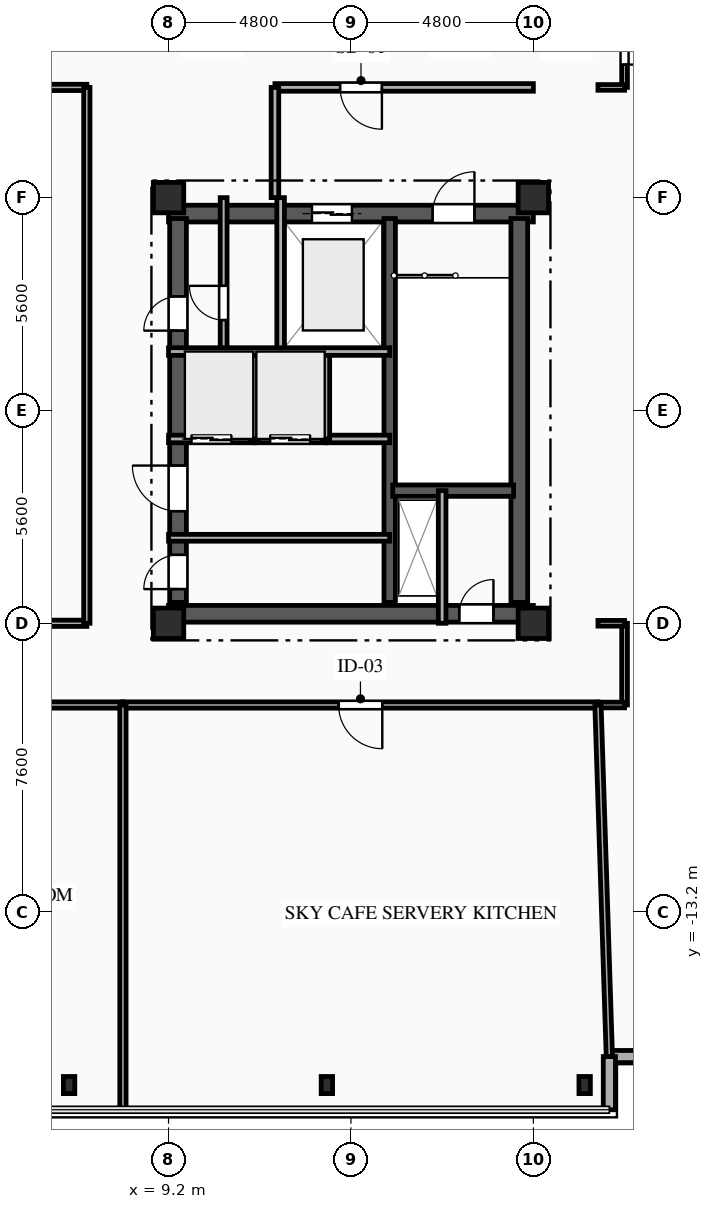
"""IFC4 building model, lengths in metres.
Left out: names, types, materials, properties, quantities, classifications, styles, units other than length and angle.
Written with IfcOpenShell. Run it as: python <this file> out.ifc"""

import sys

from ifc_helpers import new_model, si_unit, direction, frame, frame_2d, origin, origin_2d, place, context, subcontext, project, spatial, rectangle, i_section, extrude, element, fill, save


model = new_model("IFC4")
c1 = context("Model", 3, precision=1e-05, world=origin(), true_north=direction((0.0, 1.0)))
c2 = subcontext(c1, "Body", "Model", "MODEL_VIEW")
j1 = project(units=[si_unit("LENGTHUNIT", "METRE"), si_unit("PLANEANGLEUNIT", "RADIAN")], contexts=[c1])
p1 = place(None, origin())
s1 = spatial("IfcSite", under=j1, at=p1, CompositionType="ELEMENT")
p2 = place(p1, origin())
s2 = spatial("IfcBuilding", under=s1, at=p2, CompositionType="ELEMENT")
p3 = place(p2, frame((0.0, 0.0, 266.0)))
s3 = spatial("IfcBuildingStorey", under=s2, at=p3, CompositionType="ELEMENT", Elevation=266.0)
for number, where, z_axis, x_axis in (
    (1, (9.2, -5.6, 0.0), (0.0, 0.0, 1.0), (1.0, 0.0, 0.0)),
    (2, (9.2, 5.6, 0.0), (0.0, 0.0, 1.0), (1.0, 0.0, 0.0)),
    (3, (18.8, -5.6, 0.0), (0.0, 0.0, 1.0), (1.0, 0.0, 0.0)),
    (4, (18.8, 5.6, 0.0), (0.0, 0.0, 1.0), (1.0, 0.0, 0.0)),
):
    element("IfcColumn", number, at=place(p3, frame(where, z_axis=z_axis, x_axis=x_axis)), inside=s3, PredefinedType="COLUMN", context=c2, shape_type="SweptSolid", body=[
        extrude(rectangle(XDim=0.8, YDim=0.8, at=origin_2d()), origin(), (0.0, 0.0, 1.0), 4.2),
    ])
for number, where, z_axis, x_axis in (
    (5, (6.583, -17.75, 0.0), (0.0, 0.0, 1.0), (1.0, 0.0, 0.0)),
    (6, (13.367, -17.75, 0.0), (0.0, 0.0, 1.0), (1.0, 0.0, 0.0)),
    (7, (20.15, -17.75, 0.0), (0.0, 0.0, 1.0), (1.0, 0.0, 0.0)),
):
    element("IfcColumn", number, at=place(p3, frame(where, z_axis=z_axis, x_axis=x_axis)), inside=s3, PredefinedType="COLUMN", context=c2, shape_type="SweptSolid", body=[
        extrude(i_section(OverallWidth=0.3, OverallDepth=0.45, WebThickness=0.014, FlangeThickness=0.026, FilletRadius=0.027, at=origin_2d()), origin(), (0.0, 0.0, 1.0), 4.2),
    ])
for number, where, z_axis, x_axis in (
    (8, (22.2, -17.0, 0.0), (0.0, 0.0, 1.0), (-1.0, 0.0, 0.0)),
    (9, (20.8, -17.0, 0.0), (0.0, 0.0, 1.0), (0.0, -1.0, 0.0)),
):
    element("IfcWall", number, at=place(p3, frame(where, z_axis=z_axis, x_axis=x_axis)), inside=s3, PredefinedType="SOLIDWALL", context=c2, shape_type="SweptSolid", body=[
        extrude(rectangle(XDim=1.4, YDim=0.32, at=frame_2d((0.7, 0.0))), origin(), (0.0, 0.0, 1.0), 3.8),
    ])
p4 = place(p3, frame((9.2, 5.18, 0.0), z_axis=(0.0, 0.0, 1.0), x_axis=(1.0, 0.0, 0.0)))
e10 = element("IfcWall", 10, at=p4, inside=s3, PredefinedType="SHEAR", context=c2, shape_type="SweptSolid", body=[
    extrude(rectangle(XDim=9.6, YDim=0.44, at=frame_2d((4.8, 0.0))), origin(), (0.0, 0.0, 1.0), 3.8),
])
p5 = place(p4, frame((6.95, 0.0, 0.0)))
e11 = element("IfcOpeningElement", 11, at=p5, cuts=e10, PredefinedType="OPENING", context=c2, shape_type="SweptSolid", body=[
    extrude(rectangle(XDim=1.1, YDim=2.15, at=frame_2d((0.55, 1.075))), frame((0.0, 0.23, 0.0), z_axis=(0.0, -1.0, 0.0), x_axis=(1.0, 0.0, 0.0)), (0.0, 0.0, 1.0), 0.46),
])
p6 = place(p4, frame((3.775, 0.0, 0.0)))
e12 = element("IfcOpeningElement", 12, at=p6, cuts=e10, PredefinedType="OPENING", context=c2, shape_type="SweptSolid", body=[
    extrude(rectangle(XDim=1.05, YDim=2.1, at=frame_2d((0.525, 1.05))), frame((0.0, 0.23, 0.0), z_axis=(0.0, -1.0, 0.0), x_axis=(1.0, 0.0, 0.0)), (0.0, 0.0, 1.0), 0.46),
])
p7 = place(p3, frame((9.2, -5.35, 0.0), z_axis=(0.0, 0.0, 1.0), x_axis=(1.0, 0.0, 0.0)))
e13 = element("IfcWall", 13, at=p7, inside=s3, PredefinedType="SHEAR", context=c2, shape_type="SweptSolid", body=[
    extrude(rectangle(XDim=9.6, YDim=0.44, at=frame_2d((4.8, 0.0))), origin(), (0.0, 0.0, 1.0), 3.8),
])
p8 = place(p7, frame((7.65, 0.0, 0.0)))
e14 = element("IfcOpeningElement", 14, at=p8, cuts=e13, PredefinedType="OPENING", context=c2, shape_type="SweptSolid", body=[
    extrude(rectangle(XDim=0.9, YDim=2.1, at=frame_2d((0.45, 1.05))), frame((0.0, 0.23, 0.0), z_axis=(0.0, -1.0, 0.0), x_axis=(1.0, 0.0, 0.0)), (0.0, 0.0, 1.0), 0.46),
])
p9 = place(p3, frame((9.45, -5.05, 0.0), z_axis=(0.0, 0.0, 1.0), x_axis=(0.0, 1.0, 0.0)))
e15 = element("IfcWall", 15, at=p9, inside=s3, PredefinedType="SHEAR", context=c2, shape_type="SweptSolid", body=[
    extrude(rectangle(XDim=10.1, YDim=0.44, at=frame_2d((5.05, 0.0))), origin(), (0.0, 0.0, 1.0), 3.8),
])
p10 = place(p9, frame((7.15, 0.0, 0.0)))
e16 = element("IfcOpeningElement", 16, at=p10, cuts=e15, PredefinedType="OPENING", context=c2, shape_type="SweptSolid", body=[
    extrude(rectangle(XDim=0.9, YDim=2.1, at=frame_2d((0.45, 1.05))), frame((0.0, 0.23, 0.0), z_axis=(0.0, -1.0, 0.0), x_axis=(1.0, 0.0, 0.0)), (0.0, 0.0, 1.0), 0.46),
])
p11 = place(p9, frame((2.4, 0.0, 0.0)))
e17 = element("IfcOpeningElement", 17, at=p11, cuts=e15, PredefinedType="OPENING", context=c2, shape_type="SweptSolid", body=[
    extrude(rectangle(XDim=1.2, YDim=2.15, at=frame_2d((0.6, 1.075))), frame((0.0, 0.23, 0.0), z_axis=(0.0, -1.0, 0.0), x_axis=(1.0, 0.0, 0.0)), (0.0, 0.0, 1.0), 0.46),
])
p12 = place(p9, frame((0.35, 0.0, 0.0)))
e18 = element("IfcOpeningElement", 18, at=p12, cuts=e15, PredefinedType="OPENING", context=c2, shape_type="SweptSolid", body=[
    extrude(rectangle(XDim=0.9, YDim=2.1, at=frame_2d((0.45, 1.05))), frame((0.0, 0.23, 0.0), z_axis=(0.0, -1.0, 0.0), x_axis=(1.0, 0.0, 0.0)), (0.0, 0.0, 1.0), 0.46),
])
p13 = place(p3, frame((18.43, -5.05, 0.0), z_axis=(0.0, 0.0, 1.0), x_axis=(0.0, 1.0, 0.0)))
e19 = element("IfcWall", 19, at=p13, inside=s3, PredefinedType="SHEAR", context=c2, shape_type="SweptSolid", body=[
    extrude(rectangle(XDim=10.1, YDim=0.44, at=frame_2d((5.05, 0.0))), origin(), (0.0, 0.0, 1.0), 3.8),
])
p14 = place(p3, frame((15.02, -5.05, 0.0), z_axis=(0.0, 0.0, 1.0), x_axis=(0.0, 1.0, 0.0)))
e20 = element("IfcWall", 20, at=p14, inside=s3, PredefinedType="SHEAR", context=c2, shape_type="SweptSolid", body=[
    extrude(rectangle(XDim=10.1, YDim=0.3, at=frame_2d((5.05, 0.0))), origin(), (0.0, 0.0, 1.0), 3.8),
])
p15 = place(p3, frame((15.1, -2.11, 0.0), z_axis=(0.0, 0.0, 1.0), x_axis=(1.0, 0.0, 0.0)))
e21 = element("IfcWall", 21, at=p15, inside=s3, PredefinedType="SHEAR", context=c2, shape_type="SweptSolid", body=[
    extrude(rectangle(XDim=3.18, YDim=0.3, at=frame_2d((1.59, 0.0))), origin(), (0.0, 0.0, 1.0), 3.8),
])
p16 = place(p3, frame((16.4, -2.11, 0.0), z_axis=(0.0, 0.0, 1.0), x_axis=(0.0, -1.0, 0.0)))
e22 = element("IfcWall", 22, at=p16, inside=s3, PredefinedType="PARTITIONING", context=c2, shape_type="SweptSolid", body=[
    extrude(rectangle(XDim=3.49, YDim=0.2, at=frame_2d((1.745, 0.0))), origin(), (0.0, 0.0, 1.0), 3.8),
])
p17 = place(p3, frame((12.15, 5.6, 0.0), z_axis=(0.0, 0.0, 1.0), x_axis=(0.0, -1.0, 0.0)))
e23 = element("IfcWall", 23, at=p17, inside=s3, PredefinedType="PARTITIONING", context=c2, shape_type="SweptSolid", body=[
    extrude(rectangle(XDim=4.05, YDim=0.2, at=frame_2d((2.025, 0.0))), origin(), (0.0, 0.0, 1.0), 3.8),
])
p18 = place(p3, frame((18.8, 8.5, 0.0), z_axis=(0.0, 0.0, 1.0), x_axis=(-1.0, 0.0, 0.0)))
e24 = element("IfcWall", 24, at=p18, inside=s3, PredefinedType="PARTITIONING", context=c2, shape_type="SweptSolid", body=[
    extrude(rectangle(XDim=6.8, YDim=0.2, at=frame_2d((3.4, 0.0))), origin(), (0.0, 0.0, 1.0), 3.8),
])
p19 = place(p18, frame((3.985, 0.0, 0.0)))
e25 = element("IfcOpeningElement", 25, at=p19, cuts=e24, PredefinedType="OPENING", context=c2, shape_type="SweptSolid", body=[
    extrude(rectangle(XDim=1.1, YDim=2.15, at=frame_2d((0.55, 1.075))), frame((0.0, 0.11, 0.0), z_axis=(0.0, -1.0, 0.0), x_axis=(1.0, 0.0, 0.0)), (0.0, 0.0, 1.0), 0.22),
])
p20 = place(p3, frame((12.0, 8.5, 0.0), z_axis=(0.0, 0.0, 1.0), x_axis=(0.0, -1.0, 0.0)))
e26 = element("IfcWall", 26, at=p20, inside=s3, PredefinedType="PARTITIONING", context=c2, shape_type="SweptSolid", body=[
    extrude(rectangle(XDim=2.9, YDim=0.2, at=frame_2d((1.45, 0.0))), origin(), (0.0, 0.0, 1.0), 3.8),
])
p21 = place(p3, frame((10.65, 1.55, 0.0), z_axis=(0.0, 0.0, 1.0), x_axis=(0.0, 1.0, 0.0)))
e27 = element("IfcWall", 27, at=p21, inside=s3, PredefinedType="PARTITIONING", context=c2, shape_type="SweptSolid", body=[
    extrude(rectangle(XDim=4.05, YDim=0.18, at=frame_2d((2.025, 0.0))), origin(), (0.0, 0.0, 1.0), 3.8),
])
p22 = place(p21, frame((0.829, 0.0, 0.0)))
e28 = element("IfcOpeningElement", 28, at=p22, cuts=e27, PredefinedType="OPENING", context=c2, shape_type="SweptSolid", body=[
    extrude(rectangle(XDim=0.9, YDim=2.1, at=frame_2d((0.45, 1.05))), frame((0.0, 0.1, 0.0), z_axis=(0.0, -1.0, 0.0), x_axis=(1.0, 0.0, 0.0)), (0.0, 0.0, 1.0), 0.2),
])
p23 = place(p3, frame((9.2, -3.35, 0.0), z_axis=(0.0, 0.0, 1.0), x_axis=(1.0, 0.0, 0.0)))
e29 = element("IfcWall", 29, at=p23, inside=s3, PredefinedType="PARTITIONING", context=c2, shape_type="SweptSolid", body=[
    extrude(rectangle(XDim=5.82, YDim=0.18, at=frame_2d((2.91, 0.0))), origin(), (0.0, 0.0, 1.0), 3.8),
])
p24 = place(p3, frame((11.46, -0.75, 0.0), z_axis=(0.0, 0.0, 1.0), x_axis=(-1.0, 0.0, 0.0)))
e30 = element("IfcWall", 30, at=p24, inside=s3, PredefinedType="PARTITIONING", context=c2, shape_type="SweptSolid", body=[
    extrude(rectangle(XDim=2.26, YDim=0.2, at=frame_2d((1.13, 0.0))), origin(), (0.0, 0.0, 1.0), 3.8),
])
p25 = place(p24, frame((0.605, 0.0, 0.0)))
e31 = element("IfcOpeningElement", 31, at=p25, cuts=e30, PredefinedType="OPENING", context=c2, shape_type="SweptSolid", body=[
    extrude(rectangle(XDim=1.05, YDim=2.1, at=frame_2d((0.525, 1.05))), frame((0.0, 0.11, 0.0), z_axis=(0.0, -1.0, 0.0), x_axis=(1.0, 0.0, 0.0)), (0.0, 0.0, 1.0), 0.22),
])
p26 = place(p3, frame((13.34, -0.75, 0.0), z_axis=(0.0, 0.0, 1.0), x_axis=(-1.0, 0.0, 0.0)))
e32 = element("IfcWall", 32, at=p26, inside=s3, PredefinedType="PARTITIONING", context=c2, shape_type="SweptSolid", body=[
    extrude(rectangle(XDim=1.88, YDim=0.2, at=frame_2d((0.94, 0.0))), origin(), (0.0, 0.0, 1.0), 3.8),
])
p27 = place(p26, frame((0.415, 0.0, 0.0)))
e33 = element("IfcOpeningElement", 33, at=p27, cuts=e32, PredefinedType="OPENING", context=c2, shape_type="SweptSolid", body=[
    extrude(rectangle(XDim=1.05, YDim=2.1, at=frame_2d((0.525, 1.05))), frame((0.0, 0.11, 0.0), z_axis=(0.0, -1.0, 0.0), x_axis=(1.0, 0.0, 0.0)), (0.0, 0.0, 1.0), 0.22),
])
p28 = place(p3, frame((15.02, -0.75, 0.0), z_axis=(0.0, 0.0, 1.0), x_axis=(-1.0, 0.0, 0.0)))
e34 = element("IfcWall", 34, at=p28, inside=s3, PredefinedType="PARTITIONING", context=c2, shape_type="SweptSolid", body=[
    extrude(rectangle(XDim=1.68, YDim=0.2, at=frame_2d((0.84, 0.0))), origin(), (0.0, 0.0, 1.0), 3.8),
])
for number, where, z_axis, x_axis in (
    (35, (11.46, -0.75, 0.0), (0.0, 0.0, 1.0), (0.0, 1.0, 0.0)),
    (36, (13.34, -0.75, 0.0), (0.0, 0.0, 1.0), (0.0, 1.0, 0.0)),
):
    element("IfcWall", number, at=place(p3, frame(where, z_axis=z_axis, x_axis=x_axis)), inside=s3, PredefinedType="PARTITIONING", context=c2, shape_type="SweptSolid", body=[
        extrude(rectangle(XDim=2.3, YDim=0.2, at=frame_2d((1.15, 0.0))), origin(), (0.0, 0.0, 1.0), 3.8),
    ])
p29 = place(p3, frame((7.05, 8.5, 0.0), z_axis=(0.0, 0.0, 1.0), x_axis=(-1.0, 0.0, 0.0)))
e37 = element("IfcWall", 37, at=p29, inside=s3, PredefinedType="PARTITIONING", context=c2, shape_type="SweptSolid", body=[
    extrude(rectangle(XDim=4.05, YDim=0.165, at=frame_2d((2.025, 0.0))), origin(), (0.0, 0.0, 1.0), 3.8),
])
p30 = place(p3, frame((21.2, 10.65, 0.0), z_axis=(0.0, 0.0, 1.0), x_axis=(0.0, -1.0, 0.0)))
e38 = element("IfcWall", 38, at=p30, inside=s3, PredefinedType="PARTITIONING", context=c2, shape_type="SweptSolid", body=[
    extrude(rectangle(XDim=2.15, YDim=0.15, at=frame_2d((1.075, 0.0))), origin(), (0.0, 0.0, 1.0), 3.8),
])
p31 = place(p30, frame((0.6, 0.0, 0.0)))
e39 = element("IfcOpeningElement", 39, at=p31, cuts=e38, PredefinedType="OPENING", context=c2, shape_type="SweptSolid", body=[
    extrude(rectangle(XDim=0.95, YDim=2.1, at=frame_2d((0.475, 1.05))), frame((0.0, 0.085, 0.0), z_axis=(0.0, -1.0, 0.0), x_axis=(1.0, 0.0, 0.0)), (0.0, 0.0, 1.0), 0.17),
])
p32 = place(p3, frame((21.2, 8.5, 0.0), z_axis=(0.0, 0.0, 1.0), x_axis=(-1.0, 0.0, 0.0)))
e40 = element("IfcWall", 40, at=p32, inside=s3, PredefinedType="PARTITIONING", context=c2, shape_type="SweptSolid", body=[
    extrude(rectangle(XDim=0.7, YDim=0.15, at=frame_2d((0.35, 0.0))), origin(), (0.0, 0.0, 1.0), 3.8),
])
p33 = place(p3, frame((0.0, -5.6, 0.0), z_axis=(0.0, 0.0, 1.0), x_axis=(1.0, 0.0, 0.0)))
e41 = element("IfcWall", 41, at=p33, inside=s3, PredefinedType="PARTITIONING", context=c2, shape_type="SweptSolid", body=[
    extrude(rectangle(XDim=7.05, YDim=0.165, at=frame_2d((3.525, 0.0))), origin(), (0.0, 0.0, 1.0), 3.285),
])
p34 = place(p3, frame((8.0, -7.75, 0.0), z_axis=(0.0, 0.0, 1.0), x_axis=(-1.0, 0.0, 0.0)))
e42 = element("IfcWall", 42, at=p34, inside=s3, PredefinedType="PARTITIONING", context=c2, shape_type="SweptSolid", body=[
    extrude(rectangle(XDim=8.0, YDim=0.165, at=frame_2d((4.0, 0.0))), origin(), (0.0, 0.0, 1.0), 3.8),
])
p35 = place(p3, frame((20.5, -7.75, 0.0), z_axis=(0.0, 0.0, 1.0), x_axis=(-1.0, 0.0, 0.0)))
e43 = element("IfcWall", 43, at=p35, inside=s3, PredefinedType="PARTITIONING", context=c2, shape_type="SweptSolid", body=[
    extrude(rectangle(XDim=12.5, YDim=0.165, at=frame_2d((6.25, 0.0))), origin(), (0.0, 0.0, 1.0), 3.8),
])
p36 = place(p35, frame((5.675, 0.0, 0.0)))
e44 = element("IfcOpeningElement", 44, at=p36, cuts=e43, PredefinedType="OPENING", context=c2, shape_type="SweptSolid", body=[
    extrude(rectangle(XDim=1.15, YDim=2.15, at=frame_2d((0.575, 1.075))), frame((0.0, 0.093, 0.0), z_axis=(0.0, -1.0, 0.0), x_axis=(1.0, 0.0, 0.0)), (0.0, 0.0, 1.0), 0.185),
])
p37 = place(p3, frame((21.2, -5.6, 0.0), z_axis=(0.0, 0.0, 1.0), x_axis=(0.0, -1.0, 0.0)))
e45 = element("IfcWall", 45, at=p37, inside=s3, PredefinedType="PARTITIONING", context=c2, shape_type="SweptSolid", body=[
    extrude(rectangle(XDim=2.15, YDim=0.15, at=frame_2d((1.075, 0.0))), origin(), (0.0, 0.0, 1.0), 3.8),
])
for number, where, z_axis, x_axis in (
    (46, (20.5, -5.6, 0.0), (0.0, 0.0, 1.0), (1.0, 0.0, 0.0)),
    (47, (21.2, -7.75, 0.0), (0.0, 0.0, 1.0), (-1.0, 0.0, 0.0)),
):
    element("IfcWall", number, at=place(p3, frame(where, z_axis=z_axis, x_axis=x_axis)), inside=s3, PredefinedType="PARTITIONING", context=c2, shape_type="SweptSolid", body=[
        extrude(rectangle(XDim=0.7, YDim=0.15, at=frame_2d((0.35, 0.0))), origin(), (0.0, 0.0, 1.0), 3.8),
    ])
p38 = place(p3, frame((7.05, -5.6, 0.0), z_axis=(0.0, 0.0, 1.0), x_axis=(0.0, 1.0, 0.0)))
e48 = element("IfcWall", 48, at=p38, inside=s3, PredefinedType="PARTITIONING", context=c2, shape_type="SweptSolid", body=[
    extrude(rectangle(XDim=14.1, YDim=0.165, at=frame_2d((7.05, 0.0))), origin(), (0.0, 0.0, 1.0), 3.8),
])
p39 = place(p3, frame((8.0, -7.75, 0.0), z_axis=(0.0, 0.0, 1.0), x_axis=(0.0, -1.0, 0.0)))
e49 = element("IfcWall", 49, at=p39, inside=s3, PredefinedType="PARTITIONING", context=c2, shape_type="SweptSolid", body=[
    extrude(rectangle(XDim=10.65, YDim=0.165, at=frame_2d((5.325, 0.0))), origin(), (0.0, 0.0, 1.0), 3.425),
])
p40 = place(p3, frame((20.5, -7.75, 0.0), z_axis=(0.0, 0.0, 1.0), x_axis=(0.032420659042, -0.99947431226, 0.0)))
e50 = element("IfcWall", 50, at=p40, inside=s3, PredefinedType="PARTITIONING", context=c2, shape_type="SweptSolid", body=[
    extrude(rectangle(XDim=9.255, YDim=0.165, at=frame_2d((4.627, 0.0))), origin(), (0.0, 0.0, 1.0), 3.8),
])
p41 = place(p3, frame((9.2, 1.55, 0.0), z_axis=(0.0, 0.0, 1.0), x_axis=(1.0, 0.0, 0.0)))
e51 = element("IfcWall", 51, at=p41, inside=s3, PredefinedType="PARTITIONING", context=c2, shape_type="SweptSolid", body=[
    extrude(rectangle(XDim=5.82, YDim=0.2, at=frame_2d((2.91, 0.0))), origin(), (0.0, 0.0, 1.0), 3.8),
])
p42 = place(p5, origin())
e52 = element("IfcDoor", 52, at=p42, inside=s3, OperationType="SINGLE_SWING_RIGHT", PredefinedType="DOOR", context=c2, shape_type="SweptSolid", body=[
    extrude(rectangle(XDim=1.1, YDim=2.15, at=frame_2d((0.55, 1.075))), frame((0.0, 0.025, 0.0), z_axis=(0.0, -1.0, 0.0), x_axis=(1.0, 0.0, 0.0)), (0.0, 0.0, 1.0), 0.05),
])
fill(e11, e52)
p43 = place(p6, origin())
e53 = element("IfcDoor", 53, at=p43, inside=s3, OperationType="DOUBLE_DOOR_SLIDING", PredefinedType="DOOR", context=c2, shape_type="SweptSolid", body=[
    extrude(rectangle(XDim=1.05, YDim=2.1, at=frame_2d((0.525, 1.05))), frame((0.0, 0.025, 0.0), z_axis=(0.0, -1.0, 0.0), x_axis=(1.0, 0.0, 0.0)), (0.0, 0.0, 1.0), 0.05),
])
fill(e12, e53)
p44 = place(p8, origin())
e54 = element("IfcDoor", 54, at=p44, inside=s3, OperationType="SINGLE_SWING_RIGHT", PredefinedType="DOOR", context=c2, shape_type="SweptSolid", body=[
    extrude(rectangle(XDim=0.9, YDim=2.1, at=frame_2d((0.45, 1.05))), frame((0.0, 0.025, 0.0), z_axis=(0.0, -1.0, 0.0), x_axis=(1.0, 0.0, 0.0)), (0.0, 0.0, 1.0), 0.05),
])
fill(e14, e54)
p45 = place(p19, origin())
e55 = element("IfcDoor", 55, at=p45, inside=s3, OperationType="SINGLE_SWING_LEFT", PredefinedType="DOOR", context=c2, shape_type="SweptSolid", body=[
    extrude(rectangle(XDim=1.1, YDim=2.15, at=frame_2d((0.55, 1.075))), frame((0.0, 0.025, 0.0), z_axis=(0.0, -1.0, 0.0), x_axis=(1.0, 0.0, 0.0)), (0.0, 0.0, 1.0), 0.05),
])
fill(e25, e55)
p46 = place(p22, origin())
e56 = element("IfcDoor", 56, at=p46, inside=s3, OperationType="SINGLE_SWING_RIGHT", PredefinedType="DOOR", context=c2, shape_type="SweptSolid", body=[
    extrude(rectangle(XDim=0.9, YDim=2.1, at=frame_2d((0.45, 1.05))), frame((0.0, 0.025, 0.0), z_axis=(0.0, -1.0, 0.0), x_axis=(1.0, 0.0, 0.0)), (0.0, 0.0, 1.0), 0.05),
])
fill(e28, e56)
p47 = place(p10, origin())
e57 = element("IfcDoor", 57, at=p47, inside=s3, OperationType="SINGLE_SWING_LEFT", PredefinedType="DOOR", context=c2, shape_type="SweptSolid", body=[
    extrude(rectangle(XDim=0.9, YDim=2.1, at=frame_2d((0.45, 1.05))), frame((0.0, 0.025, 0.0), z_axis=(0.0, -1.0, 0.0), x_axis=(1.0, 0.0, 0.0)), (0.0, 0.0, 1.0), 0.05),
])
fill(e16, e57)
p48 = place(p25, origin())
e58 = element("IfcDoor", 58, at=p48, inside=s3, OperationType="DOUBLE_DOOR_SLIDING", PredefinedType="DOOR", context=c2, shape_type="SweptSolid", body=[
    extrude(rectangle(XDim=1.05, YDim=2.1, at=frame_2d((0.525, 1.05))), frame((0.0, 0.025, 0.0), z_axis=(0.0, -1.0, 0.0), x_axis=(1.0, 0.0, 0.0)), (0.0, 0.0, 1.0), 0.05),
])
fill(e31, e58)
p49 = place(p27, origin())
e59 = element("IfcDoor", 59, at=p49, inside=s3, OperationType="DOUBLE_DOOR_SLIDING", PredefinedType="DOOR", context=c2, shape_type="SweptSolid", body=[
    extrude(rectangle(XDim=1.05, YDim=2.1, at=frame_2d((0.525, 1.05))), frame((0.0, 0.025, 0.0), z_axis=(0.0, -1.0, 0.0), x_axis=(1.0, 0.0, 0.0)), (0.0, 0.0, 1.0), 0.05),
])
fill(e33, e59)
p50 = place(p11, origin())
e60 = element("IfcDoor", 60, at=p50, inside=s3, OperationType="SINGLE_SWING_RIGHT", PredefinedType="DOOR", context=c2, shape_type="SweptSolid", body=[
    extrude(rectangle(XDim=1.2, YDim=2.15, at=frame_2d((0.6, 1.075))), frame((0.0, 0.025, 0.0), z_axis=(0.0, -1.0, 0.0), x_axis=(1.0, 0.0, 0.0)), (0.0, 0.0, 1.0), 0.05),
])
fill(e17, e60)
p51 = place(p12, origin())
e61 = element("IfcDoor", 61, at=p51, inside=s3, OperationType="SINGLE_SWING_LEFT", PredefinedType="DOOR", context=c2, shape_type="SweptSolid", body=[
    extrude(rectangle(XDim=0.9, YDim=2.1, at=frame_2d((0.45, 1.05))), frame((0.0, 0.025, 0.0), z_axis=(0.0, -1.0, 0.0), x_axis=(1.0, 0.0, 0.0)), (0.0, 0.0, 1.0), 0.05),
])
fill(e18, e61)
p52 = place(p31, origin())
e62 = element("IfcDoor", 62, at=p52, inside=s3, OperationType="SINGLE_SWING_RIGHT", PredefinedType="DOOR", context=c2, shape_type="SweptSolid", body=[
    extrude(rectangle(XDim=0.95, YDim=2.1, at=frame_2d((0.475, 1.05))), frame((0.0, 0.025, 0.0), z_axis=(0.0, -1.0, 0.0), x_axis=(1.0, 0.0, 0.0)), (0.0, 0.0, 1.0), 0.05),
])
fill(e39, e62)
p53 = place(p36, origin())
e63 = element("IfcDoor", 63, at=p53, inside=s3, OperationType="SINGLE_SWING_LEFT", PredefinedType="DOOR", context=c2, shape_type="SweptSolid", body=[
    extrude(rectangle(XDim=1.15, YDim=2.15, at=frame_2d((0.575, 1.075))), frame((0.0, 0.025, 0.0), z_axis=(0.0, -1.0, 0.0), x_axis=(1.0, 0.0, 0.0)), (0.0, 0.0, 1.0), 0.05),
])
fill(e44, e63)
save(model, sys.argv[1])
